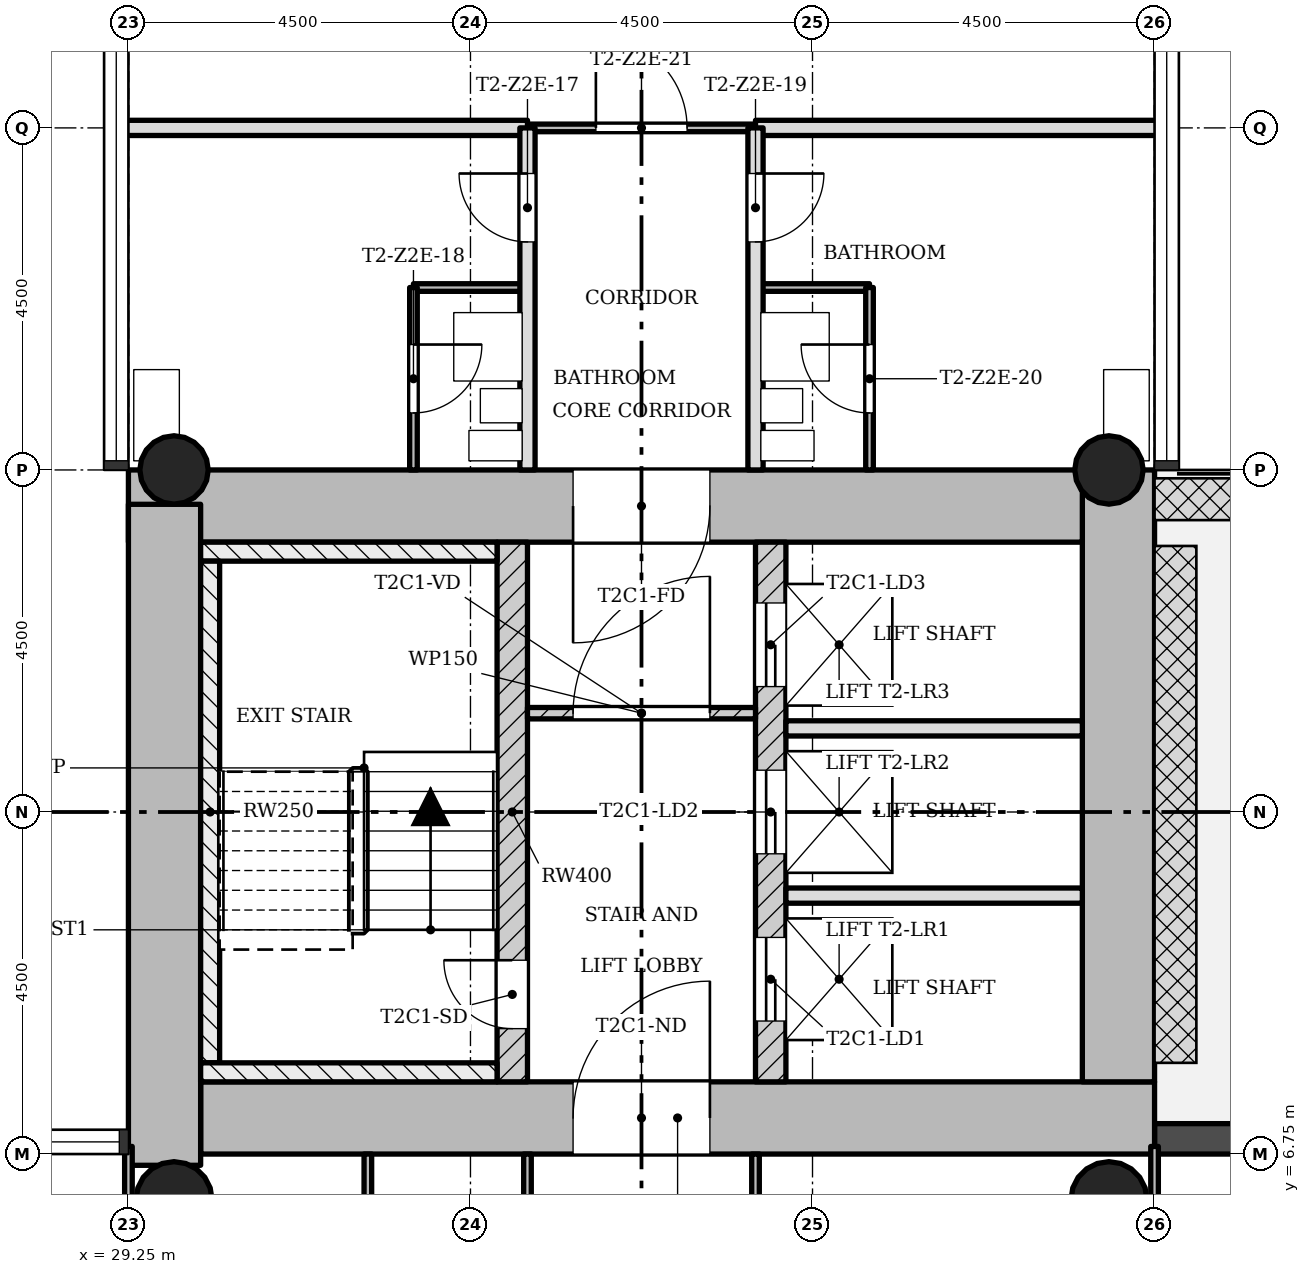
"""IFC4 building model, lengths in metres.
Left out: names, types, materials, properties, quantities, classifications, styles, units other than length and angle.
Written with IfcOpenShell. Run it as: python <this file> out.ifc"""

import sys

from ifc_helpers import new_model, si_unit, direction, frame, frame_2d, origin, origin_2d, place, context, subcontext, project, spatial, rectangle, hollow_circle, extrude, element, fill, save


model = new_model("IFC4")
c1 = context("Model", 3, precision=1e-05, world=origin(), true_north=direction((0.0, 1.0)))
c2 = subcontext(c1, "Body", "Model", "MODEL_VIEW")
j1 = project(units=[si_unit("LENGTHUNIT", "METRE"), si_unit("PLANEANGLEUNIT", "RADIAN")], contexts=[c1])
p1 = place(None, origin())
s1 = spatial("IfcSite", under=j1, at=p1, CompositionType="ELEMENT")
p2 = place(p1, origin())
s2 = spatial("IfcBuilding", under=s1, at=p2, CompositionType="ELEMENT")
p3 = place(p2, frame((0.0, 0.0, 97.0)))
s3 = spatial("IfcBuildingStorey", under=s2, at=p3, CompositionType="ELEMENT", Elevation=97.0)
p4 = place(p3, frame((30.2, 7.225, 0.0), z_axis=(0.0, 0.0, 1.0), x_axis=(1.0, 0.0, 0.0)))
e1 = element("IfcWall", 1, at=p4, inside=s3, PredefinedType="SHEAR", context=c2, shape_type="SweptSolid", body=[
    extrude(rectangle(XDim=12.55, YDim=0.95, at=frame_2d((6.275, 0.0))), origin(), (0.0, 0.0, 1.0), 3.4),
])
p5 = place(p4, frame((4.9, 0.0, 0.0)))
e2 = element("IfcOpeningElement", 2, at=p5, cuts=e1, PredefinedType="OPENING", context=c2, shape_type="SweptSolid", body=[
    extrude(rectangle(XDim=1.8, YDim=2.1, at=frame_2d((0.9, 1.05))), frame((0.0, 0.485, 0.0), z_axis=(0.0, -1.0, 0.0), x_axis=(1.0, 0.0, 0.0)), (0.0, 0.0, 1.0), 0.97),
])
p6 = place(p3, frame((42.275, 7.7, 0.0), z_axis=(0.0, 0.0, 1.0), x_axis=(0.0, 1.0, 0.0)))
e3 = element("IfcWall", 3, at=p6, inside=s3, PredefinedType="SHEAR", context=c2, shape_type="SweptSolid", body=[
    extrude(rectangle(XDim=8.05, YDim=0.95, at=frame_2d((4.025, 0.0))), origin(), (0.0, 0.0, 1.0), 3.4),
])
p7 = place(p3, frame((41.8, 15.275, 0.0), z_axis=(0.0, 0.0, 1.0), x_axis=(-1.0, 0.0, 0.0)))
e4 = element("IfcWall", 4, at=p7, inside=s3, PredefinedType="SHEAR", context=c2, shape_type="SweptSolid", body=[
    extrude(rectangle(XDim=12.55, YDim=0.95, at=frame_2d((6.275, 0.0))), origin(), (0.0, 0.0, 1.0), 3.4),
])
p8 = place(p7, frame((4.9, 0.0, 0.0)))
e5 = element("IfcOpeningElement", 5, at=p8, cuts=e4, PredefinedType="OPENING", context=c2, shape_type="SweptSolid", body=[
    extrude(rectangle(XDim=1.8, YDim=2.1, at=frame_2d((0.9, 1.05))), frame((0.0, 0.485, 0.0), z_axis=(0.0, -1.0, 0.0), x_axis=(1.0, 0.0, 0.0)), (0.0, 0.0, 1.0), 0.97),
])
p9 = place(p3, frame((29.725, 15.298, 0.0), z_axis=(0.0, 0.0, 1.0), x_axis=(0.0, -1.0, 0.0)))
e6 = element("IfcWall", 6, at=p9, inside=s3, PredefinedType="SHEAR", context=c2, shape_type="SweptSolid", body=[
    extrude(rectangle(XDim=8.696, YDim=0.95, at=frame_2d((4.348, 0.0))), origin(), (0.0, 0.0, 1.0), 3.4),
])
p10 = place(p3, frame((34.3, 7.7, 0.0), z_axis=(0.0, 0.0, 1.0), x_axis=(0.0, 1.0, 0.0)))
e7 = element("IfcWall", 7, at=p10, inside=s3, PredefinedType="SHEAR", context=c2, shape_type="SweptSolid", body=[
    extrude(rectangle(XDim=7.1, YDim=0.4, at=frame_2d((3.55, 0.0))), origin(), (0.0, 0.0, 1.0), 3.4),
])
p11 = place(p10, frame((0.7, 0.0, 0.0)))
e8 = element("IfcOpeningElement", 8, at=p11, cuts=e7, PredefinedType="OPENING", context=c2, shape_type="SweptSolid", body=[
    extrude(rectangle(XDim=0.9, YDim=2.1, at=frame_2d((0.45, 1.05))), frame((0.0, 0.21, 0.0), z_axis=(0.0, -1.0, 0.0), x_axis=(1.0, 0.0, 0.0)), (0.0, 0.0, 1.0), 0.42),
])
p12 = place(p3, frame((37.7, 7.7, 0.0), z_axis=(0.0, 0.0, 1.0), x_axis=(0.0, 1.0, 0.0)))
e9 = element("IfcWall", 9, at=p12, inside=s3, PredefinedType="SHEAR", context=c2, shape_type="SweptSolid", body=[
    extrude(rectangle(XDim=7.1, YDim=0.4, at=frame_2d((3.55, 0.0))), origin(), (0.0, 0.0, 1.0), 3.4),
])
p13 = place(p12, frame((0.8, 0.0, 0.0)))
e10 = element("IfcOpeningElement", 10, at=p13, cuts=e9, PredefinedType="OPENING", context=c2, shape_type="SweptSolid", body=[
    extrude(rectangle(XDim=1.1, YDim=2.1, at=frame_2d((0.55, 1.05))), frame((0.0, 0.21, 0.0), z_axis=(0.0, -1.0, 0.0), x_axis=(1.0, 0.0, 0.0)), (0.0, 0.0, 1.0), 0.42),
])
p14 = place(p12, frame((3.0, 0.0, 0.0)))
e11 = element("IfcOpeningElement", 11, at=p14, cuts=e9, PredefinedType="OPENING", context=c2, shape_type="SweptSolid", body=[
    extrude(rectangle(XDim=1.1, YDim=2.1, at=frame_2d((0.55, 1.05))), frame((0.0, 0.21, 0.0), z_axis=(0.0, -1.0, 0.0), x_axis=(1.0, 0.0, 0.0)), (0.0, 0.0, 1.0), 0.42),
])
p15 = place(p12, frame((5.2, 0.0, 0.0)))
e12 = element("IfcOpeningElement", 12, at=p15, cuts=e9, PredefinedType="OPENING", context=c2, shape_type="SweptSolid", body=[
    extrude(rectangle(XDim=1.1, YDim=2.1, at=frame_2d((0.55, 1.05))), frame((0.0, 0.21, 0.0), z_axis=(0.0, -1.0, 0.0), x_axis=(1.0, 0.0, 0.0)), (0.0, 0.0, 1.0), 0.42),
])
for number, where, z_axis, x_axis in (
    (13, (42.15, 15.75, 0.0), (0.0, 0.0, 1.0), (1.0, 0.0, 0.0)),
    (14, (29.85, 15.75, 0.0), (0.0, 0.0, 1.0), (1.0, 0.0, 0.0)),
):
    element("IfcColumn", number, at=place(p3, frame(where, z_axis=z_axis, x_axis=x_axis)), inside=s3, PredefinedType="COLUMN", context=c2, shape_type="SweptSolid", body=[
        extrude(hollow_circle(Radius=0.45, WallThickness=0.032, at=origin_2d()), origin(), (0.0, 0.0, 1.0), 3.4),
    ])
for number, where, z_axis, x_axis in (
    (15, (42.15, 6.15, 0.0), (0.0, 0.0, 1.0), (1.0, 0.0, 0.0)),
    (16, (29.85, 6.15, 0.0), (0.0, 0.0, 1.0), (1.0, 0.0, 0.0)),
):
    element("IfcColumn", number, at=place(p3, frame(where, z_axis=z_axis, x_axis=x_axis)), inside=s3, PredefinedType="COLUMN", context=c2, shape_type="SweptSolid", body=[
        extrude(hollow_circle(Radius=0.5, WallThickness=0.036, at=origin_2d()), origin(), (0.0, 0.0, 1.0), 3.4),
    ])
p16 = place(p3, frame((47.25, 6.95, -0.02), z_axis=(0.0, 0.0, 1.0), x_axis=(-1.0, 0.0, 0.0)))
e17 = element("IfcWall", 17, at=p16, inside=s3, PredefinedType="STANDARD", context=c2, shape_type="SweptSolid", body=[
    extrude(rectangle(XDim=4.5, YDim=0.4, at=frame_2d((2.25, 0.0))), origin(), (0.0, 0.0, 1.0), 3.12),
])
p17 = place(p16, frame((1.35, 0.0, 0.02)))
e18 = element("IfcOpeningElement", 18, at=p17, cuts=e17, PredefinedType="OPENING", context=c2, shape_type="SweptSolid", body=[
    extrude(rectangle(XDim=1.8, YDim=2.1, at=frame_2d((0.9, 1.05))), frame((0.0, 0.21, 0.0), z_axis=(0.0, -1.0, 0.0), x_axis=(1.0, 0.0, 0.0)), (0.0, 0.0, 1.0), 0.42),
])
p18 = place(p3, frame((37.5, 12.55, 0.0), z_axis=(0.0, 0.0, 1.0), x_axis=(-1.0, 0.0, 0.0)))
e19 = element("IfcWall", 19, at=p18, inside=s3, PredefinedType="PARTITIONING", context=c2, shape_type="SweptSolid", body=[
    extrude(rectangle(XDim=3.0, YDim=0.15, at=frame_2d((1.5, 0.0))), origin(), (0.0, 0.0, 1.0), 3.0),
])
p19 = place(p18, frame((0.6, 0.0, 0.0)))
e20 = element("IfcOpeningElement", 20, at=p19, cuts=e19, PredefinedType="OPENING", context=c2, shape_type="SweptSolid", body=[
    extrude(rectangle(XDim=1.8, YDim=2.1, at=frame_2d((0.9, 1.05))), frame((0.0, 0.085, 0.0), z_axis=(0.0, -1.0, 0.0), x_axis=(1.0, 0.0, 0.0)), (0.0, 0.0, 1.0), 0.17),
])
for number, where, z_axis, x_axis in (
    (21, (41.8, 10.15, 0.0), (0.0, 0.0, 1.0), (-1.0, 0.0, 0.0)),
    (22, (41.8, 12.35, 0.0), (0.0, 0.0, 1.0), (-1.0, 0.0, 0.0)),
):
    element("IfcWall", number, at=place(p3, frame(where, z_axis=z_axis, x_axis=x_axis)), inside=s3, PredefinedType="SOLIDWALL", context=c2, shape_type="SweptSolid", body=[
        extrude(rectangle(XDim=3.9, YDim=0.2, at=frame_2d((1.95, 0.0))), origin(), (0.0, 0.0, 1.0), 3.0),
    ])
for number, where, z_axis, x_axis in (
    (23, (39.0, 18.15, 0.0), (0.0, 0.0, 1.0), (-1.0, 0.0, 0.0)),
    (24, (34.5, 18.15, 0.0), (0.0, 0.0, 1.0), (-1.0, 0.0, 0.0)),
):
    element("IfcWall", number, at=place(p3, frame(where, z_axis=z_axis, x_axis=x_axis)), inside=s3, PredefinedType="PARTITIONING", context=c2, shape_type="SweptSolid", body=[
        extrude(rectangle(XDim=1.5, YDim=0.1, at=frame_2d((0.75, 0.0))), origin(), (0.0, 0.0, 1.0), 3.0),
    ])
p20 = place(p3, frame((37.5, 20.25, 0.0), z_axis=(0.0, 0.0, 1.0), x_axis=(-1.0, 0.0, 0.0)))
e25 = element("IfcWall", 25, at=p20, inside=s3, PredefinedType="PARTITIONING", context=c2, shape_type="SweptSolid", body=[
    extrude(rectangle(XDim=3.0, YDim=0.1, at=frame_2d((1.5, 0.0))), origin(), (0.0, 0.0, 1.0), 3.0),
])
p21 = place(p20, frame((0.9, 0.0, 0.0)))
e26 = element("IfcOpeningElement", 26, at=p21, cuts=e25, PredefinedType="OPENING", context=c2, shape_type="SweptSolid", body=[
    extrude(rectangle(XDim=1.2, YDim=2.1, at=frame_2d((0.6, 1.05))), frame((0.0, 0.06, 0.0), z_axis=(0.0, -1.0, 0.0), x_axis=(1.0, 0.0, 0.0)), (0.0, 0.0, 1.0), 0.12),
])
for number, where, z_axis, x_axis in (
    (27, (42.85, 20.25, 0.0), (0.0, 0.0, 1.0), (-1.0, 0.0, 0.0)),
    (28, (34.5, 20.25, 0.0), (0.0, 0.0, 1.0), (-1.0, 0.0, 0.0)),
):
    element("IfcWall", number, at=place(p3, frame(where, z_axis=z_axis, x_axis=x_axis)), inside=s3, PredefinedType="SOLIDWALL", context=c2, shape_type="SweptSolid", body=[
        extrude(rectangle(XDim=5.35, YDim=0.2, at=frame_2d((2.675, 0.0))), origin(), (0.0, 0.0, 1.0), 3.0),
    ])
p22 = place(p3, frame((42.75, 0.9, 0.0), z_axis=(0.0, 0.0, 1.0), x_axis=(0.0, 1.0, 0.0)))
e29 = element("IfcWall", 29, at=p22, inside=s3, PredefinedType="PARTITIONING", context=c2, shape_type="SweptSolid", body=[
    extrude(rectangle(XDim=5.95, YDim=0.1, at=frame_2d((2.975, 0.0))), origin(), (0.0, 0.0, 1.0), 3.0),
])
p23 = place(p3, frame((39.0, 15.75, 0.0), z_axis=(0.0, 0.0, 1.0), x_axis=(0.0, 1.0, 0.0)))
e30 = element("IfcWall", 30, at=p23, inside=s3, PredefinedType="PARTITIONING", context=c2, shape_type="SweptSolid", body=[
    extrude(rectangle(XDim=2.4, YDim=0.1, at=frame_2d((1.2, 0.0))), origin(), (0.0, 0.0, 1.0), 3.0),
])
p24 = place(p23, frame((0.75, 0.0, 0.0)))
e31 = element("IfcOpeningElement", 31, at=p24, cuts=e30, PredefinedType="OPENING", context=c2, shape_type="SweptSolid", body=[
    extrude(rectangle(XDim=0.9, YDim=2.1, at=frame_2d((0.45, 1.05))), frame((0.0, 0.06, 0.0), z_axis=(0.0, -1.0, 0.0), x_axis=(1.0, 0.0, 0.0)), (0.0, 0.0, 1.0), 0.12),
])
p25 = place(p3, frame((37.5, 0.9, 0.0), z_axis=(0.0, 0.0, 1.0), x_axis=(0.0, 1.0, 0.0)))
e32 = element("IfcWall", 32, at=p25, inside=s3, PredefinedType="PARTITIONING", context=c2, shape_type="SweptSolid", body=[
    extrude(rectangle(XDim=5.85, YDim=0.1, at=frame_2d((2.925, 0.0))), origin(), (0.0, 0.0, 1.0), 3.0),
])
p26 = place(p25, frame((4.125, 0.0, 0.0)))
e33 = element("IfcOpeningElement", 33, at=p26, cuts=e32, PredefinedType="OPENING", context=c2, shape_type="SweptSolid", body=[
    extrude(rectangle(XDim=0.9, YDim=2.1, at=frame_2d((0.45, 1.05))), frame((0.0, 0.06, 0.0), z_axis=(0.0, -1.0, 0.0), x_axis=(1.0, 0.0, 0.0)), (0.0, 0.0, 1.0), 0.12),
])
p27 = place(p3, frame((37.5, 15.75, 0.0), z_axis=(0.0, 0.0, 1.0), x_axis=(0.0, 1.0, 0.0)))
e34 = element("IfcWall", 34, at=p27, inside=s3, PredefinedType="SOLIDWALL", context=c2, shape_type="SweptSolid", body=[
    extrude(rectangle(XDim=4.5, YDim=0.2, at=frame_2d((2.25, 0.0))), origin(), (0.0, 0.0, 1.0), 3.0),
])
p28 = place(p27, frame((3.0, 0.0, 0.0)))
e35 = element("IfcOpeningElement", 35, at=p28, cuts=e34, PredefinedType="OPENING", context=c2, shape_type="SweptSolid", body=[
    extrude(rectangle(XDim=0.9, YDim=2.1, at=frame_2d((0.45, 1.05))), frame((0.0, 0.11, 0.0), z_axis=(0.0, -1.0, 0.0), x_axis=(1.0, 0.0, 0.0)), (0.0, 0.0, 1.0), 0.22),
])
p29 = place(p3, frame((34.5, 0.9, 0.0), z_axis=(0.0, 0.0, 1.0), x_axis=(0.0, 1.0, 0.0)))
e36 = element("IfcWall", 36, at=p29, inside=s3, PredefinedType="PARTITIONING", context=c2, shape_type="SweptSolid", body=[
    extrude(rectangle(XDim=5.85, YDim=0.1, at=frame_2d((2.925, 0.0))), origin(), (0.0, 0.0, 1.0), 3.0),
])
p30 = place(p29, frame((2.475, 0.0, 0.0)))
e37 = element("IfcOpeningElement", 37, at=p30, cuts=e36, PredefinedType="OPENING", context=c2, shape_type="SweptSolid", body=[
    extrude(rectangle(XDim=0.9, YDim=2.1, at=frame_2d((0.45, 1.05))), frame((0.0, 0.06, 0.0), z_axis=(0.0, -1.0, 0.0), x_axis=(1.0, 0.0, 0.0)), (0.0, 0.0, 1.0), 0.12),
])
p31 = place(p3, frame((34.5, 15.75, 0.0), z_axis=(0.0, 0.0, 1.0), x_axis=(0.0, 1.0, 0.0)))
e38 = element("IfcWall", 38, at=p31, inside=s3, PredefinedType="SOLIDWALL", context=c2, shape_type="SweptSolid", body=[
    extrude(rectangle(XDim=4.5, YDim=0.2, at=frame_2d((2.25, 0.0))), origin(), (0.0, 0.0, 1.0), 3.0),
])
p32 = place(p31, frame((3.0, 0.0, 0.0)))
e39 = element("IfcOpeningElement", 39, at=p32, cuts=e38, PredefinedType="OPENING", context=c2, shape_type="SweptSolid", body=[
    extrude(rectangle(XDim=0.9, YDim=2.1, at=frame_2d((0.45, 1.05))), frame((0.0, 0.11, 0.0), z_axis=(0.0, -1.0, 0.0), x_axis=(1.0, 0.0, 0.0)), (0.0, 0.0, 1.0), 0.22),
])
p33 = place(p3, frame((33.0, 15.75, 0.0), z_axis=(0.0, 0.0, 1.0), x_axis=(0.0, 1.0, 0.0)))
e40 = element("IfcWall", 40, at=p33, inside=s3, PredefinedType="PARTITIONING", context=c2, shape_type="SweptSolid", body=[
    extrude(rectangle(XDim=2.4, YDim=0.1, at=frame_2d((1.2, 0.0))), origin(), (0.0, 0.0, 1.0), 3.0),
])
p34 = place(p33, frame((0.75, 0.0, 0.0)))
e41 = element("IfcOpeningElement", 41, at=p34, cuts=e40, PredefinedType="OPENING", context=c2, shape_type="SweptSolid", body=[
    extrude(rectangle(XDim=0.9, YDim=2.1, at=frame_2d((0.45, 1.05))), frame((0.0, 0.06, 0.0), z_axis=(0.0, -1.0, 0.0), x_axis=(1.0, 0.0, 0.0)), (0.0, 0.0, 1.0), 0.12),
])
p35 = place(p3, frame((32.4, 0.9, 0.0), z_axis=(0.0, 0.0, 1.0), x_axis=(0.0, 1.0, 0.0)))
e42 = element("IfcWall", 42, at=p35, inside=s3, PredefinedType="PARTITIONING", context=c2, shape_type="SweptSolid", body=[
    extrude(rectangle(XDim=5.85, YDim=0.1, at=frame_2d((2.925, 0.0))), origin(), (0.0, 0.0, 1.0), 3.0),
])
p36 = place(p3, frame((29.25, 0.9, 0.0), z_axis=(0.0, 0.0, 1.0), x_axis=(0.0, 1.0, 0.0)))
e43 = element("IfcWall", 43, at=p36, inside=s3, PredefinedType="PARTITIONING", context=c2, shape_type="SweptSolid", body=[
    extrude(rectangle(XDim=5.95, YDim=0.1, at=frame_2d((2.975, 0.0))), origin(), (0.0, 0.0, 1.0), 3.0),
])
p37 = place(p3, frame((34.1, 14.675, 0.0), z_axis=(0.0, 0.0, 1.0), x_axis=(-1.0, 0.0, 0.0)))
e44 = element("IfcWall", 44, at=p37, inside=s3, PredefinedType="SHEAR", context=c2, shape_type="SweptSolid", body=[
    extrude(rectangle(XDim=3.9, YDim=0.25, at=frame_2d((1.95, 0.0))), origin(), (0.0, 0.0, 1.0), 3.4),
])
p38 = place(p3, frame((30.325, 7.95, 0.0), z_axis=(0.0, 0.0, 1.0), x_axis=(0.0, 1.0, 0.0)))
e45 = element("IfcWall", 45, at=p38, inside=s3, PredefinedType="SHEAR", context=c2, shape_type="SweptSolid", body=[
    extrude(rectangle(XDim=6.6, YDim=0.25, at=frame_2d((3.3, 0.0))), origin(), (0.0, 0.0, 1.0), 3.4),
])
p39 = place(p3, frame((34.1, 7.825, 0.0), z_axis=(0.0, 0.0, 1.0), x_axis=(-1.0, 0.0, 0.0)))
e46 = element("IfcWall", 46, at=p39, inside=s3, PredefinedType="SHEAR", context=c2, shape_type="SweptSolid", body=[
    extrude(rectangle(XDim=3.9, YDim=0.25, at=frame_2d((1.95, 0.0))), origin(), (0.0, 0.0, 1.0), 3.4),
])
p40 = place(p19, origin())
e47 = element("IfcDoor", 47, at=p40, inside=s3, OperationType="SINGLE_SWING_LEFT", PredefinedType="DOOR", context=c2, shape_type="SweptSolid", body=[
    extrude(rectangle(XDim=1.8, YDim=2.1, at=frame_2d((0.9, 1.05))), frame((0.0, 0.025, 0.0), z_axis=(0.0, -1.0, 0.0), x_axis=(1.0, 0.0, 0.0)), (0.0, 0.0, 1.0), 0.05),
])
fill(e20, e47)
p41 = place(p32, origin())
e48 = element("IfcDoor", 48, at=p41, inside=s3, OperationType="SINGLE_SWING_LEFT", PredefinedType="DOOR", context=c2, shape_type="SweptSolid", body=[
    extrude(rectangle(XDim=0.9, YDim=2.1, at=frame_2d((0.45, 1.05))), frame((0.0, 0.025, 0.0), z_axis=(0.0, -1.0, 0.0), x_axis=(1.0, 0.0, 0.0)), (0.0, 0.0, 1.0), 0.05),
])
fill(e39, e48)
p42 = place(p34, origin())
e49 = element("IfcDoor", 49, at=p42, inside=s3, OperationType="SINGLE_SWING_RIGHT", PredefinedType="DOOR", context=c2, shape_type="SweptSolid", body=[
    extrude(rectangle(XDim=0.9, YDim=2.1, at=frame_2d((0.45, 1.05))), frame((0.0, 0.025, 0.0), z_axis=(0.0, -1.0, 0.0), x_axis=(1.0, 0.0, 0.0)), (0.0, 0.0, 1.0), 0.05),
])
fill(e41, e49)
p43 = place(p28, origin())
e50 = element("IfcDoor", 50, at=p43, inside=s3, OperationType="SINGLE_SWING_RIGHT", PredefinedType="DOOR", context=c2, shape_type="SweptSolid", body=[
    extrude(rectangle(XDim=0.9, YDim=2.1, at=frame_2d((0.45, 1.05))), frame((0.0, 0.025, 0.0), z_axis=(0.0, -1.0, 0.0), x_axis=(1.0, 0.0, 0.0)), (0.0, 0.0, 1.0), 0.05),
])
fill(e35, e50)
p44 = place(p24, origin())
e51 = element("IfcDoor", 51, at=p44, inside=s3, OperationType="SINGLE_SWING_LEFT", PredefinedType="DOOR", context=c2, shape_type="SweptSolid", body=[
    extrude(rectangle(XDim=0.9, YDim=2.1, at=frame_2d((0.45, 1.05))), frame((0.0, 0.025, 0.0), z_axis=(0.0, -1.0, 0.0), x_axis=(1.0, 0.0, 0.0)), (0.0, 0.0, 1.0), 0.05),
])
fill(e31, e51)
p45 = place(p21, origin())
e52 = element("IfcDoor", 52, at=p45, inside=s3, OperationType="SINGLE_SWING_RIGHT", PredefinedType="DOOR", context=c2, shape_type="SweptSolid", body=[
    extrude(rectangle(XDim=1.2, YDim=2.1, at=frame_2d((0.6, 1.05))), frame((0.0, 0.025, 0.0), z_axis=(0.0, -1.0, 0.0), x_axis=(1.0, 0.0, 0.0)), (0.0, 0.0, 1.0), 0.05),
])
fill(e26, e52)
p46 = place(p11, origin())
e53 = element("IfcDoor", 53, at=p46, inside=s3, OperationType="SINGLE_SWING_LEFT", PredefinedType="DOOR", context=c2, shape_type="SweptSolid", body=[
    extrude(rectangle(XDim=0.9, YDim=2.1, at=frame_2d((0.45, 1.05))), frame((0.0, 0.025, 0.0), z_axis=(0.0, -1.0, 0.0), x_axis=(1.0, 0.0, 0.0)), (0.0, 0.0, 1.0), 0.05),
])
fill(e8, e53)
p47 = place(p13, origin())
e54 = element("IfcDoor", 54, at=p47, inside=s3, OperationType="SLIDING_TO_LEFT", PredefinedType="DOOR", context=c2, shape_type="SweptSolid", body=[
    extrude(rectangle(XDim=1.1, YDim=2.1, at=frame_2d((0.55, 1.05))), frame((0.0, 0.025, 0.0), z_axis=(0.0, -1.0, 0.0), x_axis=(1.0, 0.0, 0.0)), (0.0, 0.0, 1.0), 0.05),
])
fill(e10, e54)
p48 = place(p14, origin())
e55 = element("IfcDoor", 55, at=p48, inside=s3, OperationType="SLIDING_TO_LEFT", PredefinedType="DOOR", context=c2, shape_type="SweptSolid", body=[
    extrude(rectangle(XDim=1.1, YDim=2.1, at=frame_2d((0.55, 1.05))), frame((0.0, 0.025, 0.0), z_axis=(0.0, -1.0, 0.0), x_axis=(1.0, 0.0, 0.0)), (0.0, 0.0, 1.0), 0.05),
])
fill(e11, e55)
p49 = place(p15, origin())
e56 = element("IfcDoor", 56, at=p49, inside=s3, OperationType="SLIDING_TO_LEFT", PredefinedType="DOOR", context=c2, shape_type="SweptSolid", body=[
    extrude(rectangle(XDim=1.1, YDim=2.1, at=frame_2d((0.55, 1.05))), frame((0.0, 0.025, 0.0), z_axis=(0.0, -1.0, 0.0), x_axis=(1.0, 0.0, 0.0)), (0.0, 0.0, 1.0), 0.05),
])
fill(e12, e56)
p50 = place(p5, origin())
e57 = element("IfcDoor", 57, at=p50, inside=s3, OperationType="SINGLE_SWING_LEFT", PredefinedType="DOOR", context=c2, shape_type="SweptSolid", body=[
    extrude(rectangle(XDim=1.8, YDim=2.1, at=frame_2d((0.9, 1.05))), frame((0.0, 0.025, 0.0), z_axis=(0.0, -1.0, 0.0), x_axis=(1.0, 0.0, 0.0)), (0.0, 0.0, 1.0), 0.05),
])
fill(e2, e57)
p51 = place(p8, origin())
e58 = element("IfcDoor", 58, at=p51, inside=s3, OperationType="SINGLE_SWING_LEFT", PredefinedType="DOOR", context=c2, shape_type="SweptSolid", body=[
    extrude(rectangle(XDim=1.8, YDim=2.1, at=frame_2d((0.9, 1.05))), frame((0.0, 0.025, 0.0), z_axis=(0.0, -1.0, 0.0), x_axis=(1.0, 0.0, 0.0)), (0.0, 0.0, 1.0), 0.05),
])
fill(e5, e58)
save(model, sys.argv[1])
